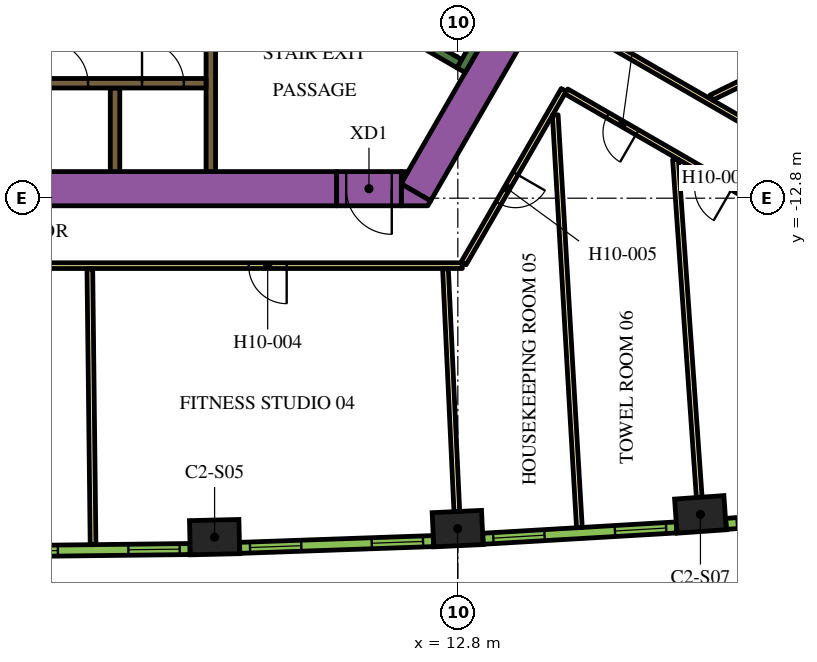
"""IFC4 building model, lengths in metres.
Left out: names, types, materials, properties, quantities, classifications, styles, units other than length and angle.
Written with IfcOpenShell. Run it as: python <this file> out.ifc"""

import sys

from ifc_helpers import new_model, si_unit, direction, frame, frame_2d, origin, origin_2d, place, context, subcontext, project, spatial, polyline, rectangle, outline, extrude, element, fill, save


model = new_model("IFC4")
c1 = context("Model", 3, precision=1e-05, world=origin(), true_north=direction((0.0, 1.0)))
c2 = subcontext(c1, "Body", "Model", "MODEL_VIEW")
j1 = project(units=[si_unit("LENGTHUNIT", "METRE"), si_unit("PLANEANGLEUNIT", "RADIAN")], contexts=[c1])
p1 = place(None, origin())
s1 = spatial("IfcSite", under=j1, at=p1, CompositionType="ELEMENT")
p2 = place(p1, origin())
s2 = spatial("IfcBuilding", under=s1, at=p2, CompositionType="ELEMENT")
p3 = place(p2, frame((0.0, 0.0, 130.5)))
s3 = spatial("IfcBuildingStorey", under=s2, at=p3, CompositionType="ELEMENT", Elevation=130.5)
for number, where, z_axis, x_axis in (
    (1, (6.399, -21.719, 0.0), (0.0, 0.0, 1.0), (1.0, 0.023, 0.0)),
    (2, (12.795, -21.494, 0.0), (0.0, 0.0, 1.0), (0.999, 0.047, 0.0)),
    (3, (19.184, -21.12, 0.0), (0.0, 0.0, 1.0), (0.998, 0.07, 0.0)),
):
    element("IfcColumn", number, at=place(p3, frame(where, z_axis=z_axis, x_axis=x_axis)), inside=s3, PredefinedType="COLUMN", context=c2, shape_type="SweptSolid", body=[
        extrude(rectangle(XDim=1.3, YDim=0.9, at=origin_2d()), origin(), (0.0, 0.0, 1.0), 3.9),
    ])
p4 = place(p3, frame((11.695, -12.644, 0.0), z_axis=(0.0, 0.0, 1.0), x_axis=(0.500010229568, 0.86601949766, 0.0)))
e4 = element("IfcWall", 4, at=p4, inside=s3, PredefinedType="SOLIDWALL", context=c2, shape_type="SweptSolid", body=[
    extrude(rectangle(XDim=9.326, YDim=0.9, at=frame_2d((4.663, 0.0))), origin(), (0.0, 0.0, 1.0), 3.9),
])
p5 = place(p3, origin())
e5 = element("IfcWall", 5, at=p5, inside=s3, PredefinedType="SOLIDWALL", context=c2, shape_type="SweptSolid", body=[
    extrude(outline(polyline([(12.009, -13.0), (11.312, -13.0), (11.312, -12.425), (12.083, -12.871), (12.009, -13.0)])), origin(), (0.0, 0.0, 1.0), 3.9),
])
e6 = element("IfcWall", 6, at=p5, inside=s3, PredefinedType="SOLIDWALL", context=c2, shape_type="SweptSolid", body=[
    extrude(outline(polyline([(11.489, -12.1), (11.312, -12.407), (11.312, -12.1), (11.489, -12.1)])), origin(), (0.0, 0.0, 1.0), 3.9),
])
p6 = place(p3, frame((-12.019, -12.55, 0.0), z_axis=(0.0, 0.0, 1.0), x_axis=(1.0, 0.0, 0.0)))
e7 = element("IfcWall", 7, at=p6, inside=s3, PredefinedType="SOLIDWALL", context=c2, shape_type="SweptSolid", body=[
    extrude(rectangle(XDim=21.63, YDim=0.9, at=frame_2d((10.815, 0.0))), origin(), (0.0, 0.0, 1.0), 3.9),
])
p7 = place(p3, frame((12.885, -9.431, 0.0), z_axis=(0.0, 0.0, 1.0), x_axis=(0.500020560727, 0.866013532718, 0.0)))
e8 = element("IfcWall", 8, at=p7, inside=s3, PredefinedType="SOLIDWALL", context=c2, shape_type="SweptSolid", body=[
    extrude(rectangle(XDim=3.45, YDim=0.25, at=frame_2d((1.725, 0.0))), origin(), (0.0, 0.0, 1.0), 3.9),
])
p8 = place(p3, frame((12.84, -9.261, 0.0), z_axis=(0.0, 0.0, 1.0), x_axis=(-0.866013990052, 0.500019768644, 0.0)))
e9 = element("IfcWall", 9, at=p8, inside=s3, PredefinedType="SOLIDWALL", context=c2, shape_type="SweptSolid", body=[
    extrude(rectangle(XDim=6.8, YDim=0.25, at=frame_2d((3.4, 0.0))), origin(), (0.0, 0.0, 1.0), 3.9),
])
p9 = place(p3, frame((6.3, -8.67, 0.0), z_axis=(0.0, 0.0, 1.0), x_axis=(0.0, -1.0, 0.0)))
e10 = element("IfcWall", 10, at=p9, inside=s3, PredefinedType="SOLIDWALL", context=c2, shape_type="SweptSolid", body=[
    extrude(rectangle(XDim=3.43, YDim=0.25, at=frame_2d((1.715, 0.0))), origin(), (0.0, 0.0, 1.0), 3.9),
])
p10 = place(p3, frame((3.78, -12.1, 0.0), z_axis=(0.0, 0.0, 1.0), x_axis=(0.0, 1.0, 0.0)))
e11 = element("IfcWall", 11, at=p10, inside=s3, PredefinedType="SOLIDWALL", context=c2, shape_type="SweptSolid", body=[
    extrude(rectangle(XDim=2.2, YDim=0.25, at=frame_2d((1.1, 0.0))), origin(), (0.0, 0.0, 1.0), 3.9),
])
p11 = place(p3, frame((-6.175, -9.775, 0.0), z_axis=(0.0, 0.0, 1.0), x_axis=(1.0, 0.0, 0.0)))
e12 = element("IfcWall", 12, at=p11, inside=s3, PredefinedType="SOLIDWALL", context=c2, shape_type="SweptSolid", body=[
    extrude(rectangle(XDim=12.35, YDim=0.25, at=frame_2d((6.175, 0.0))), origin(), (0.0, 0.0, 1.0), 3.9),
])
p12 = place(p11, frame((0.585, 0.0, 0.0)))
e13 = element("IfcOpeningElement", 13, at=p12, cuts=e12, PredefinedType="OPENING", context=c2, shape_type="SweptSolid", body=[
    extrude(rectangle(XDim=1.1, YDim=2.1, at=frame_2d((0.55, 1.05))), frame((0.0, 0.135, 0.0), z_axis=(0.0, -1.0, 0.0), x_axis=(1.0, 0.0, 0.0)), (0.0, 0.0, 1.0), 0.27),
])
p13 = place(p11, frame((3.105, 0.0, 0.0)))
e14 = element("IfcOpeningElement", 14, at=p13, cuts=e12, PredefinedType="OPENING", context=c2, shape_type="SweptSolid", body=[
    extrude(rectangle(XDim=1.1, YDim=2.1, at=frame_2d((0.55, 1.05))), frame((0.0, 0.135, 0.0), z_axis=(0.0, -1.0, 0.0), x_axis=(1.0, 0.0, 0.0)), (0.0, 0.0, 1.0), 0.27),
])
p14 = place(p11, frame((5.625, 0.0, 0.0)))
e15 = element("IfcOpeningElement", 15, at=p14, cuts=e12, PredefinedType="OPENING", context=c2, shape_type="SweptSolid", body=[
    extrude(rectangle(XDim=1.1, YDim=2.1, at=frame_2d((0.55, 1.05))), frame((0.0, 0.135, 0.0), z_axis=(0.0, -1.0, 0.0), x_axis=(1.0, 0.0, 0.0)), (0.0, 0.0, 1.0), 0.27),
])
p15 = place(p11, frame((8.145, 0.0, 0.0)))
e16 = element("IfcOpeningElement", 16, at=p15, cuts=e12, PredefinedType="OPENING", context=c2, shape_type="SweptSolid", body=[
    extrude(rectangle(XDim=1.1, YDim=2.1, at=frame_2d((0.55, 1.05))), frame((0.0, 0.135, 0.0), z_axis=(0.0, -1.0, 0.0), x_axis=(1.0, 0.0, 0.0)), (0.0, 0.0, 1.0), 0.27),
])
p16 = place(p11, frame((10.665, 0.0, 0.0)))
e17 = element("IfcOpeningElement", 17, at=p16, cuts=e12, PredefinedType="OPENING", context=c2, shape_type="SweptSolid", body=[
    extrude(rectangle(XDim=1.1, YDim=2.1, at=frame_2d((0.55, 1.05))), frame((0.0, 0.135, 0.0), z_axis=(0.0, -1.0, 0.0), x_axis=(1.0, 0.0, 0.0)), (0.0, 0.0, 1.0), 0.27),
])
p17 = place(p3, frame((11.312, -12.55, 0.0), z_axis=(0.0, 0.0, 1.0), x_axis=(-1.0, 0.0, 0.0)))
e18 = element("IfcWall", 18, at=p17, inside=s3, PredefinedType="SOLIDWALL", context=c2, shape_type="SweptSolid", body=[
    extrude(rectangle(XDim=1.7, YDim=0.9, at=frame_2d((0.85, 0.0))), origin(), (0.0, 0.0, 1.0), 3.9),
])
p18 = place(p17, frame((0.25, 0.0, 0.0)))
e19 = element("IfcOpeningElement", 19, at=p18, cuts=e18, PredefinedType="OPENING", context=c2, shape_type="SweptSolid", body=[
    extrude(rectangle(XDim=1.2, YDim=2.1, at=frame_2d((0.6, 1.05))), frame((0.0, 0.46, 0.0), z_axis=(0.0, -1.0, 0.0), x_axis=(1.0, 0.0, 0.0)), (0.0, 0.0, 1.0), 0.92),
])
p19 = place(p3, frame((16.412, -8.523, 0.0), z_axis=(0.0, 0.0, 1.0), x_axis=(0.866025629663, -0.499999608766, 0.0)))
e20 = element("IfcWall", 20, at=p19, inside=s3, PredefinedType="PARTITIONING", context=c2, shape_type="SweptSolid", body=[
    extrude(rectangle(XDim=13.624, YDim=0.15, at=frame_2d((6.812, 0.0))), origin(), (0.0, 0.0, 1.0), 2.6),
])
p20 = place(p19, frame((6.854, 0.0, 0.0)))
e21 = element("IfcOpeningElement", 21, at=p20, cuts=e20, PredefinedType="OPENING", context=c2, shape_type="SweptSolid", body=[
    extrude(rectangle(XDim=1.0, YDim=2.1, at=frame_2d((0.5, 1.05))), frame((0.0, 0.085, 0.0), z_axis=(0.0, -1.0, 0.0), x_axis=(1.0, 0.0, 0.0)), (0.0, 0.0, 1.0), 0.17),
])
p21 = place(p3, frame((12.918, -14.575, 0.0), z_axis=(0.0, 0.0, 1.0), x_axis=(-1.0, 0.0, 0.0)))
e22 = element("IfcWall", 22, at=p21, inside=s3, PredefinedType="PARTITIONING", context=c2, shape_type="SweptSolid", body=[
    extrude(rectangle(XDim=25.766, YDim=0.15, at=frame_2d((12.883, 0.0))), origin(), (0.0, 0.0, 1.0), 2.6),
])
p22 = place(p21, frame((21.946, 0.0, 0.0)))
e23 = element("IfcOpeningElement", 23, at=p22, cuts=e22, PredefinedType="OPENING", context=c2, shape_type="SweptSolid", body=[
    extrude(rectangle(XDim=1.0, YDim=2.1, at=frame_2d((0.5, 1.05))), frame((0.0, 0.085, 0.0), z_axis=(0.0, -1.0, 0.0), x_axis=(1.0, 0.0, 0.0)), (0.0, 0.0, 1.0), 0.17),
])
p23 = place(p21, frame((13.977, 0.0, 0.0)))
e24 = element("IfcOpeningElement", 24, at=p23, cuts=e22, PredefinedType="OPENING", context=c2, shape_type="SweptSolid", body=[
    extrude(rectangle(XDim=1.0, YDim=2.1, at=frame_2d((0.5, 1.05))), frame((0.0, 0.085, 0.0), z_axis=(0.0, -1.0, 0.0), x_axis=(1.0, 0.0, 0.0)), (0.0, 0.0, 1.0), 0.17),
])
p24 = place(p21, frame((4.622, 0.0, 0.0)))
e25 = element("IfcOpeningElement", 25, at=p24, cuts=e22, PredefinedType="OPENING", context=c2, shape_type="SweptSolid", body=[
    extrude(rectangle(XDim=1.0, YDim=2.1, at=frame_2d((0.5, 1.05))), frame((0.0, 0.085, 0.0), z_axis=(0.0, -1.0, 0.0), x_axis=(1.0, 0.0, 0.0)), (0.0, 0.0, 1.0), 0.17),
])
p25 = place(p3, frame((15.587, -9.952, 0.0), z_axis=(0.0, 0.0, 1.0), x_axis=(-0.500016618951, -0.866015808616, 0.0)))
e26 = element("IfcWall", 26, at=p25, inside=s3, PredefinedType="PARTITIONING", context=c2, shape_type="SweptSolid", body=[
    extrude(rectangle(XDim=5.268, YDim=0.15, at=frame_2d((2.634, 0.0))), origin(), (0.0, 0.0, 1.0), 2.6),
])
p26 = place(p25, frame((2.538, 0.0, 0.0)))
e27 = element("IfcOpeningElement", 27, at=p26, cuts=e26, PredefinedType="OPENING", context=c2, shape_type="SweptSolid", body=[
    extrude(rectangle(XDim=0.9, YDim=2.1, at=frame_2d((0.45, 1.05))), frame((0.0, 0.085, 0.0), z_axis=(0.0, -1.0, 0.0), x_axis=(1.0, 0.0, 0.0)), (0.0, 0.0, 1.0), 0.17),
])
p27 = place(p3, frame((27.386, -16.764, 0.0), z_axis=(0.0, 0.0, 1.0), x_axis=(-0.866022585856, 0.500004880763, 0.0)))
e28 = element("IfcWall", 28, at=p27, inside=s3, PredefinedType="PARTITIONING", context=c2, shape_type="SweptSolid", body=[
    extrude(rectangle(XDim=13.544, YDim=0.15, at=frame_2d((6.772, 0.0))), origin(), (0.0, 0.0, 1.0), 2.6),
])
p28 = place(p27, frame((11.392, 0.0, 0.0)))
e29 = element("IfcOpeningElement", 29, at=p28, cuts=e28, PredefinedType="OPENING", context=c2, shape_type="SweptSolid", body=[
    extrude(rectangle(XDim=0.9, YDim=2.1, at=frame_2d((0.45, 1.05))), frame((0.0, 0.085, 0.0), z_axis=(0.0, -1.0, 0.0), x_axis=(1.0, 0.0, 0.0)), (0.0, 0.0, 1.0), 0.17),
])
p29 = place(p27, frame((8.491, 0.0, 0.0)))
e30 = element("IfcOpeningElement", 30, at=p29, cuts=e28, PredefinedType="OPENING", context=c2, shape_type="SweptSolid", body=[
    extrude(rectangle(XDim=1.0, YDim=2.1, at=frame_2d((0.5, 1.05))), frame((0.0, 0.085, 0.0), z_axis=(0.0, -1.0, 0.0), x_axis=(1.0, 0.0, 0.0)), (0.0, 0.0, 1.0), 0.17),
])
p30 = place(p3, frame((3.202, -21.916, 0.0), z_axis=(0.0, 0.0, 1.0), x_axis=(-0.011707696285, 0.999931462575, 0.0)))
e31 = element("IfcWall", 31, at=p30, inside=s3, PredefinedType="PARTITIONING", context=c2, shape_type="SweptSolid", body=[
    extrude(rectangle(XDim=7.257, YDim=0.15, at=frame_2d((3.628, 0.0))), origin(), (0.0, 0.0, 1.0), 2.6),
])
p31 = place(p3, frame((12.774, -21.045, 0.0), z_axis=(0.0, 0.0, 1.0), x_axis=(-0.046750341626, 0.998906605023, 0.0)))
e32 = element("IfcWall", 32, at=p31, inside=s3, PredefinedType="PARTITIONING", context=c2, shape_type="SweptSolid", body=[
    extrude(rectangle(XDim=6.392, YDim=0.15, at=frame_2d((3.196, 0.0))), origin(), (0.0, 0.0, 1.0), 2.6),
])
p32 = place(p3, frame((15.999, -21.467, 0.0), z_axis=(0.0, 0.0, 1.0), x_axis=(-0.058433825336, 0.998291284173, 0.0)))
e33 = element("IfcWall", 33, at=p32, inside=s3, PredefinedType="PARTITIONING", context=c2, shape_type="SweptSolid", body=[
    extrude(rectangle(XDim=10.875, YDim=0.15, at=frame_2d((5.438, 0.0))), origin(), (0.0, 0.0, 1.0), 2.6),
])
p33 = place(p3, frame((19.153, -20.671, 0.0), z_axis=(0.0, 0.0, 1.0), x_axis=(-0.070070736723, 0.997542025107, 0.0)))
e34 = element("IfcWall", 34, at=p33, inside=s3, PredefinedType="PARTITIONING", context=c2, shape_type="SweptSolid", body=[
    extrude(rectangle(XDim=8.909, YDim=0.15, at=frame_2d((4.455, 0.0))), origin(), (0.0, 0.0, 1.0), 2.6),
])
p34 = place(p3, frame((27.479, -6.251, 0.0), z_axis=(0.0, 0.0, 1.0), x_axis=(-0.898945877276, -0.438059710231, 0.0)))
e35 = element("IfcWall", 35, at=p34, inside=s3, PredefinedType="PARTITIONING", context=c2, shape_type="SweptSolid", body=[
    extrude(rectangle(XDim=8.909, YDim=0.15, at=frame_2d((4.455, 0.0))), origin(), (0.0, 0.0, 1.0), 2.6),
])
p35 = place(p3, frame((0.653, -22.091, 0.0), z_axis=(0.0, 0.0, 1.0), x_axis=(0.999931786565, 0.011679992145, 0.0)))
e36 = element("IfcWall", 36, at=p35, inside=s3, PredefinedType="SOLIDWALL", context=c2, shape_type="SweptSolid", body=[
    extrude(rectangle(XDim=5.1, YDim=0.29, at=frame_2d((2.55, 0.0))), origin(), (0.0, 0.0, 1.0), 3.5),
])
p36 = place(p35, frame((0.273, 0.0, 0.9)))
e37 = element("IfcOpeningElement", 37, at=p36, cuts=e36, PredefinedType="OPENING", context=c2, shape_type="SweptSolid", body=[
    extrude(rectangle(XDim=1.35, YDim=2.15, at=frame_2d((0.675, 1.075))), frame((0.0, 0.155, 0.0), z_axis=(0.0, -1.0, 0.0), x_axis=(1.0, 0.0, 0.0)), (0.0, 0.0, 1.0), 0.31),
])
p37 = place(p35, frame((3.478, 0.0, 0.9)))
e38 = element("IfcOpeningElement", 38, at=p37, cuts=e36, PredefinedType="OPENING", context=c2, shape_type="SweptSolid", body=[
    extrude(rectangle(XDim=1.35, YDim=2.15, at=frame_2d((0.675, 1.075))), frame((0.0, 0.155, 0.0), z_axis=(0.0, -1.0, 0.0), x_axis=(1.0, 0.0, 0.0)), (0.0, 0.0, 1.0), 0.31),
])
p38 = place(p3, frame((7.059, -22.001, 0.0), z_axis=(0.0, 0.0, 1.0), x_axis=(0.999385993957, 0.035037623812, 0.0)))
e39 = element("IfcWall", 39, at=p38, inside=s3, PredefinedType="SOLIDWALL", context=c2, shape_type="SweptSolid", body=[
    extrude(rectangle(XDim=5.101, YDim=0.29, at=frame_2d((2.55, 0.0))), origin(), (0.0, 0.0, 1.0), 3.5),
])
p39 = place(p38, frame((0.273, 0.0, 0.9)))
e40 = element("IfcOpeningElement", 40, at=p39, cuts=e39, PredefinedType="OPENING", context=c2, shape_type="SweptSolid", body=[
    extrude(rectangle(XDim=1.35, YDim=2.15, at=frame_2d((0.675, 1.075))), frame((0.0, 0.155, 0.0), z_axis=(0.0, -1.0, 0.0), x_axis=(1.0, 0.0, 0.0)), (0.0, 0.0, 1.0), 0.31),
])
p40 = place(p38, frame((3.478, 0.0, 0.9)))
e41 = element("IfcOpeningElement", 41, at=p40, cuts=e39, PredefinedType="OPENING", context=c2, shape_type="SweptSolid", body=[
    extrude(rectangle(XDim=1.35, YDim=2.15, at=frame_2d((0.675, 1.075))), frame((0.0, 0.155, 0.0), z_axis=(0.0, -1.0, 0.0), x_axis=(1.0, 0.0, 0.0)), (0.0, 0.0, 1.0), 0.31),
])
p41 = place(p3, frame((13.462, -21.761, 0.0), z_axis=(0.0, 0.0, 1.0), x_axis=(0.998290511436, 0.058447025388, 0.0)))
e42 = element("IfcWall", 42, at=p41, inside=s3, PredefinedType="SOLIDWALL", context=c2, shape_type="SweptSolid", body=[
    extrude(rectangle(XDim=5.1, YDim=0.29, at=frame_2d((2.55, 0.0))), origin(), (0.0, 0.0, 1.0), 3.5),
])
p42 = place(p41, frame((0.272, 0.0, 0.9)))
e43 = element("IfcOpeningElement", 43, at=p42, cuts=e42, PredefinedType="OPENING", context=c2, shape_type="SweptSolid", body=[
    extrude(rectangle(XDim=1.35, YDim=2.15, at=frame_2d((0.675, 1.075))), frame((0.0, 0.155, 0.0), z_axis=(0.0, -1.0, 0.0), x_axis=(1.0, 0.0, 0.0)), (0.0, 0.0, 1.0), 0.31),
])
p43 = place(p41, frame((3.478, 0.0, 0.9)))
e44 = element("IfcOpeningElement", 44, at=p43, cuts=e42, PredefinedType="OPENING", context=c2, shape_type="SweptSolid", body=[
    extrude(rectangle(XDim=1.35, YDim=2.15, at=frame_2d((0.675, 1.075))), frame((0.0, 0.155, 0.0), z_axis=(0.0, -1.0, 0.0), x_axis=(1.0, 0.0, 0.0)), (0.0, 0.0, 1.0), 0.31),
])
p44 = place(p3, frame((19.857, -21.371, 0.0), z_axis=(0.0, 0.0, 1.0), x_axis=(0.99665273362, 0.081751627308, 0.0)))
e45 = element("IfcWall", 45, at=p44, inside=s3, PredefinedType="SOLIDWALL", context=c2, shape_type="SweptSolid", body=[
    extrude(rectangle(XDim=5.107, YDim=0.29, at=frame_2d((2.553, 0.0))), origin(), (0.0, 0.0, 1.0), 3.5),
])
p45 = place(p44, frame((0.285, 0.0, 0.9)))
e46 = element("IfcOpeningElement", 46, at=p45, cuts=e45, PredefinedType="OPENING", context=c2, shape_type="SweptSolid", body=[
    extrude(rectangle(XDim=1.35, YDim=2.15, at=frame_2d((0.675, 1.075))), frame((0.0, 0.155, 0.0), z_axis=(0.0, -1.0, 0.0), x_axis=(1.0, 0.0, 0.0)), (0.0, 0.0, 1.0), 0.31),
])
p46 = place(p44, frame((3.516, 0.0, 0.9)))
e47 = element("IfcOpeningElement", 47, at=p46, cuts=e45, PredefinedType="OPENING", context=c2, shape_type="SweptSolid", body=[
    extrude(rectangle(XDim=1.35, YDim=2.15, at=frame_2d((0.675, 1.075))), frame((0.0, 0.155, 0.0), z_axis=(0.0, -1.0, 0.0), x_axis=(1.0, 0.0, 0.0)), (0.0, 0.0, 1.0), 0.31),
])
p47 = place(p15, origin())
e48 = element("IfcDoor", 48, at=p47, inside=s3, OperationType="DOUBLE_DOOR_SLIDING", PredefinedType="DOOR", context=c2, shape_type="SweptSolid", body=[
    extrude(rectangle(XDim=1.1, YDim=2.1, at=frame_2d((0.55, 1.05))), frame((0.0, 0.025, 0.0), z_axis=(0.0, -1.0, 0.0), x_axis=(1.0, 0.0, 0.0)), (0.0, 0.0, 1.0), 0.05),
])
fill(e16, e48)
p48 = place(p16, origin())
e49 = element("IfcDoor", 49, at=p48, inside=s3, OperationType="DOUBLE_DOOR_SLIDING", PredefinedType="DOOR", context=c2, shape_type="SweptSolid", body=[
    extrude(rectangle(XDim=1.1, YDim=2.1, at=frame_2d((0.55, 1.05))), frame((0.0, 0.025, 0.0), z_axis=(0.0, -1.0, 0.0), x_axis=(1.0, 0.0, 0.0)), (0.0, 0.0, 1.0), 0.05),
])
fill(e17, e49)
p49 = place(p18, origin())
e50 = element("IfcDoor", 50, at=p49, inside=s3, OperationType="SINGLE_SWING_LEFT", PredefinedType="DOOR", context=c2, shape_type="SweptSolid", body=[
    extrude(rectangle(XDim=1.2, YDim=2.1, at=frame_2d((0.6, 1.05))), frame((0.0, 0.025, 0.0), z_axis=(0.0, -1.0, 0.0), x_axis=(1.0, 0.0, 0.0)), (0.0, 0.0, 1.0), 0.05),
])
fill(e19, e50)
p50 = place(p24, origin())
e51 = element("IfcDoor", 51, at=p50, inside=s3, OperationType="SINGLE_SWING_RIGHT", PredefinedType="DOOR", context=c2, shape_type="SweptSolid", body=[
    extrude(rectangle(XDim=1.0, YDim=2.1, at=frame_2d((0.5, 1.05))), frame((0.0, 0.025, 0.0), z_axis=(0.0, -1.0, 0.0), x_axis=(1.0, 0.0, 0.0)), (0.0, 0.0, 1.0), 0.05),
])
fill(e25, e51)
p51 = place(p26, origin())
e52 = element("IfcDoor", 52, at=p51, inside=s3, OperationType="SINGLE_SWING_LEFT", PredefinedType="DOOR", context=c2, shape_type="SweptSolid", body=[
    extrude(rectangle(XDim=0.9, YDim=2.1, at=frame_2d((0.45, 1.05))), frame((0.0, 0.025, 0.0), z_axis=(0.0, -1.0, 0.0), x_axis=(1.0, 0.0, 0.0)), (0.0, 0.0, 1.0), 0.05),
])
fill(e27, e52)
p52 = place(p28, origin())
e53 = element("IfcDoor", 53, at=p52, inside=s3, OperationType="SINGLE_SWING_RIGHT", PredefinedType="DOOR", context=c2, shape_type="SweptSolid", body=[
    extrude(rectangle(XDim=0.9, YDim=2.1, at=frame_2d((0.45, 1.05))), frame((0.0, 0.025, 0.0), z_axis=(0.0, -1.0, 0.0), x_axis=(1.0, 0.0, 0.0)), (0.0, 0.0, 1.0), 0.05),
])
fill(e29, e53)
p53 = place(p29, origin())
e54 = element("IfcDoor", 54, at=p53, inside=s3, OperationType="SINGLE_SWING_RIGHT", PredefinedType="DOOR", context=c2, shape_type="SweptSolid", body=[
    extrude(rectangle(XDim=1.0, YDim=2.1, at=frame_2d((0.5, 1.05))), frame((0.0, 0.025, 0.0), z_axis=(0.0, -1.0, 0.0), x_axis=(1.0, 0.0, 0.0)), (0.0, 0.0, 1.0), 0.05),
])
fill(e30, e54)
p54 = place(p36, origin())
e55 = element("IfcWindow", 55, at=p54, inside=s3, PartitioningType="DOUBLE_PANEL_VERTICAL", PredefinedType="WINDOW", context=c2, shape_type="SweptSolid", body=[
    extrude(rectangle(XDim=1.35, YDim=2.15, at=frame_2d((0.675, 1.075))), frame((0.0, 0.015, 0.0), z_axis=(0.0, -1.0, 0.0), x_axis=(1.0, 0.0, 0.0)), (0.0, 0.0, 1.0), 0.06),
])
fill(e37, e55)
p55 = place(p37, origin())
e56 = element("IfcWindow", 56, at=p55, inside=s3, PartitioningType="DOUBLE_PANEL_VERTICAL", PredefinedType="WINDOW", context=c2, shape_type="SweptSolid", body=[
    extrude(rectangle(XDim=1.35, YDim=2.15, at=frame_2d((0.675, 1.075))), frame((0.0, 0.015, 0.0), z_axis=(0.0, -1.0, 0.0), x_axis=(1.0, 0.0, 0.0)), (0.0, 0.0, 1.0), 0.06),
])
fill(e38, e56)
p56 = place(p39, origin())
e57 = element("IfcWindow", 57, at=p56, inside=s3, PartitioningType="DOUBLE_PANEL_VERTICAL", PredefinedType="WINDOW", context=c2, shape_type="SweptSolid", body=[
    extrude(rectangle(XDim=1.35, YDim=2.15, at=frame_2d((0.675, 1.075))), frame((0.0, 0.015, 0.0), z_axis=(0.0, -1.0, 0.0), x_axis=(1.0, 0.0, 0.0)), (0.0, 0.0, 1.0), 0.06),
])
fill(e40, e57)
p57 = place(p40, origin())
e58 = element("IfcWindow", 58, at=p57, inside=s3, PartitioningType="DOUBLE_PANEL_VERTICAL", PredefinedType="WINDOW", context=c2, shape_type="SweptSolid", body=[
    extrude(rectangle(XDim=1.35, YDim=2.15, at=frame_2d((0.675, 1.075))), frame((0.0, 0.015, 0.0), z_axis=(0.0, -1.0, 0.0), x_axis=(1.0, 0.0, 0.0)), (0.0, 0.0, 1.0), 0.06),
])
fill(e41, e58)
p58 = place(p42, origin())
e59 = element("IfcWindow", 59, at=p58, inside=s3, PartitioningType="DOUBLE_PANEL_VERTICAL", PredefinedType="WINDOW", context=c2, shape_type="SweptSolid", body=[
    extrude(rectangle(XDim=1.35, YDim=2.15, at=frame_2d((0.675, 1.075))), frame((0.0, 0.015, 0.0), z_axis=(0.0, -1.0, 0.0), x_axis=(1.0, 0.0, 0.0)), (0.0, 0.0, 1.0), 0.06),
])
fill(e43, e59)
p59 = place(p43, origin())
e60 = element("IfcWindow", 60, at=p59, inside=s3, PartitioningType="DOUBLE_PANEL_VERTICAL", PredefinedType="WINDOW", context=c2, shape_type="SweptSolid", body=[
    extrude(rectangle(XDim=1.35, YDim=2.15, at=frame_2d((0.675, 1.075))), frame((0.0, 0.015, 0.0), z_axis=(0.0, -1.0, 0.0), x_axis=(1.0, 0.0, 0.0)), (0.0, 0.0, 1.0), 0.06),
])
fill(e44, e60)
p60 = place(p45, origin())
e61 = element("IfcWindow", 61, at=p60, inside=s3, PartitioningType="DOUBLE_PANEL_VERTICAL", PredefinedType="WINDOW", context=c2, shape_type="SweptSolid", body=[
    extrude(rectangle(XDim=1.35, YDim=2.15, at=frame_2d((0.675, 1.075))), frame((0.0, 0.015, 0.0), z_axis=(0.0, -1.0, 0.0), x_axis=(1.0, 0.0, 0.0)), (0.0, 0.0, 1.0), 0.06),
])
fill(e46, e61)
save(model, sys.argv[1])
